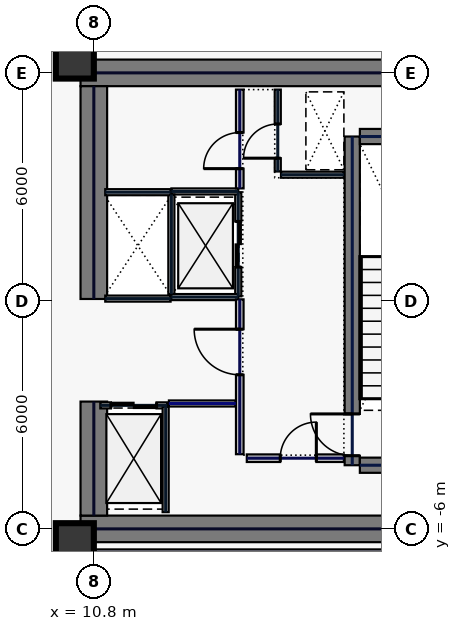
"""IFC4 building model, lengths in metres.
Left out: names, types, materials, properties, quantities, classifications, styles, units other than length and angle.
Written with IfcOpenShell. Run it as: python <this file> out.ifc"""

import sys

from ifc_helpers import new_model, si_unit, direction, frame, frame_2d, origin, origin_2d, place, context, subcontext, project, spatial, rectangle, hollow_rectangle, extrude, element, fill, save


model = new_model("IFC4")
c1 = context("Model", 3, precision=1e-05, world=origin(), true_north=direction((0.0, 1.0)))
c2 = subcontext(c1, "Body", "Model", "MODEL_VIEW")
j1 = project(units=[si_unit("LENGTHUNIT", "METRE"), si_unit("PLANEANGLEUNIT", "RADIAN")], contexts=[c1])
p1 = place(None, origin())
s1 = spatial("IfcSite", under=j1, at=p1, CompositionType="ELEMENT")
p2 = place(p1, origin())
s2 = spatial("IfcBuilding", under=s1, at=p2, CompositionType="ELEMENT")
p3 = place(p2, frame((0.0, 0.0, 152.2)))
s3 = spatial("IfcBuildingStorey", under=s2, at=p3, CompositionType="ELEMENT", Elevation=152.2)
for number, where, z_axis, x_axis in (
    (1, (10.45, 6.0, 0.0), (0.0, 0.0, 1.0), (1.0, 0.0, 0.0)),
    (2, (10.45, -6.0, 0.0), (0.0, 0.0, 1.0), (1.0, 0.0, 0.0)),
):
    element("IfcWall", number, at=place(p3, frame(where, z_axis=z_axis, x_axis=x_axis)), inside=s3, PredefinedType="SHEAR", context=c2, shape_type="SweptSolid", body=[
        extrude(rectangle(XDim=11.55, YDim=0.7, at=frame_2d((5.775, 0.0))), origin(), (0.0, 0.0, 1.0), 3.74),
    ])
p4 = place(p3, frame((10.8, -5.65, 0.0), z_axis=(0.0, 0.0, 1.0), x_axis=(0.0, 1.0, 0.0)))
e3 = element("IfcWall", 3, at=p4, inside=s3, PredefinedType="SHEAR", context=c2, shape_type="SweptSolid", body=[
    extrude(rectangle(XDim=3.0, YDim=0.7, at=frame_2d((1.5, 0.0))), origin(), (0.0, 0.0, 1.0), 3.74),
])
p5 = place(p3, frame((10.8, 0.05, 0.0), z_axis=(0.0, 0.0, 1.0), x_axis=(0.0, 1.0, 0.0)))
e4 = element("IfcWall", 4, at=p5, inside=s3, PredefinedType="SHEAR", context=c2, shape_type="SweptSolid", body=[
    extrude(rectangle(XDim=5.6, YDim=0.7, at=frame_2d((2.8, 0.0))), origin(), (0.0, 0.0, 1.0), 3.74),
])
p6 = place(p3, frame((17.6, -4.325, 0.0), z_axis=(0.0, 0.0, 1.0), x_axis=(0.0, 1.0, 0.0)))
e5 = element("IfcWall", 5, at=p6, inside=s3, PredefinedType="SHEAR", context=c2, shape_type="SweptSolid", body=[
    extrude(rectangle(XDim=8.65, YDim=0.4, at=frame_2d((4.325, 0.0))), origin(), (0.0, 0.0, 1.0), 3.74),
])
p7 = place(p6, frame((0.25, 0.0, 0.0)))
e6 = element("IfcOpeningElement", 6, at=p7, cuts=e5, PredefinedType="OPENING", context=c2, shape_type="SweptSolid", body=[
    extrude(rectangle(XDim=1.1, YDim=2.2, at=frame_2d((0.55, 1.1))), frame((0.0, 0.21, 0.0), z_axis=(0.0, -1.0, 0.0), x_axis=(1.0, 0.0, 0.0)), (0.0, 0.0, 1.0), 0.42),
])
for number, where, z_axis, x_axis in (
    (7, (17.8, -4.325, 0.0), (0.0, 0.0, 1.0), (1.0, 0.0, 0.0)),
    (8, (17.8, 4.325, 0.0), (0.0, 0.0, 1.0), (1.0, 0.0, 0.0)),
):
    element("IfcWall", number, at=place(p3, frame(where, z_axis=z_axis, x_axis=x_axis)), inside=s3, PredefinedType="SHEAR", context=c2, shape_type="SweptSolid", body=[
        extrude(rectangle(XDim=3.4, YDim=0.4, at=frame_2d((1.7, 0.0))), origin(), (0.0, 0.0, 1.0), 3.74),
    ])
for number, where, z_axis, x_axis in (
    (9, (10.3, -6.35, 0.0), (0.0, 0.0, 1.0), (1.0, 0.0, 0.0)),
    (10, (10.3, 6.35, 0.0), (0.0, 0.0, 1.0), (1.0, 0.0, 0.0)),
):
    element("IfcColumn", number, at=place(p3, frame(where, z_axis=z_axis, x_axis=x_axis)), inside=s3, PredefinedType="COLUMN", context=c2, shape_type="SweptSolid", body=[
        extrude(hollow_rectangle(XDim=1.0, YDim=1.0, WallThickness=0.045, at=origin_2d()), origin(), (0.0, 0.0, 1.0), 3.74),
    ])
p8 = place(p3, frame((14.6, 0.12, 0.0), z_axis=(0.0, 0.0, 1.0), x_axis=(0.0, 1.0, 0.0)))
e11 = element("IfcWall", 11, at=p8, inside=s3, PredefinedType="PARTITIONING", context=c2, shape_type="SweptSolid", body=[
    extrude(rectangle(XDim=2.74, YDim=0.16, at=frame_2d((1.37, 0.0))), origin(), (0.0, 0.0, 1.0), 3.74),
])
p9 = place(p8, frame((0.77, 0.0, 0.0)))
e12 = element("IfcOpeningElement", 12, at=p9, cuts=e11, PredefinedType="OPENING", context=c2, shape_type="SweptSolid", body=[
    extrude(rectangle(XDim=1.2, YDim=2.2, at=frame_2d((0.6, 1.1))), frame((0.0, 0.09, 0.0), z_axis=(0.0, -1.0, 0.0), x_axis=(1.0, 0.0, 0.0)), (0.0, 0.0, 1.0), 0.18),
])
for number, where, z_axis, x_axis in (
    (13, (12.84, 0.1, 0.0), (0.0, 0.0, 1.0), (1.0, 0.0, 0.0)),
    (14, (12.84, 2.88, 0.0), (0.0, 0.0, 1.0), (1.0, 0.0, 0.0)),
):
    element("IfcWall", number, at=place(p3, frame(where, z_axis=z_axis, x_axis=x_axis)), inside=s3, PredefinedType="PARTITIONING", context=c2, shape_type="SweptSolid", body=[
        extrude(rectangle(XDim=1.76, YDim=0.16, at=frame_2d((0.88, 0.0))), origin(), (0.0, 0.0, 1.0), 3.74),
    ])
p10 = place(p3, frame((12.84, 0.18, 0.0), z_axis=(0.0, 0.0, 1.0), x_axis=(0.0, 1.0, 0.0)))
e15 = element("IfcWall", 15, at=p10, inside=s3, PredefinedType="PARTITIONING", context=c2, shape_type="SweptSolid", body=[
    extrude(rectangle(XDim=2.62, YDim=0.16, at=frame_2d((1.31, 0.0))), origin(), (0.0, 0.0, 1.0), 3.74),
])
p11 = place(p3, frame((10.97, -2.75, 0.0), z_axis=(0.0, 0.0, 1.0), x_axis=(1.0, 0.0, 0.0)))
e16 = element("IfcWall", 16, at=p11, inside=s3, PredefinedType="PARTITIONING", context=c2, shape_type="SweptSolid", body=[
    extrude(rectangle(XDim=1.76, YDim=0.16, at=frame_2d((0.88, 0.0))), origin(), (0.0, 0.0, 1.0), 3.74),
])
p12 = place(p11, frame((0.28, 0.0, 0.0)))
e17 = element("IfcOpeningElement", 17, at=p12, cuts=e16, PredefinedType="OPENING", context=c2, shape_type="SweptSolid", body=[
    extrude(rectangle(XDim=1.2, YDim=2.2, at=frame_2d((0.6, 1.1))), frame((0.0, 0.09, 0.0), z_axis=(0.0, -1.0, 0.0), x_axis=(1.0, 0.0, 0.0)), (0.0, 0.0, 1.0), 0.18),
])
for number, where, z_axis, x_axis in (
    (18, (11.1, 0.06, 0.0), (0.0, 0.0, 1.0), (1.0, 0.0, 0.0)),
    (19, (11.1, 2.86, 0.0), (0.0, 0.0, 1.0), (1.0, 0.0, 0.0)),
):
    element("IfcWall", number, at=place(p3, frame(where, z_axis=z_axis, x_axis=x_axis)), inside=s3, PredefinedType="PARTITIONING", context=c2, shape_type="SweptSolid", body=[
        extrude(rectangle(XDim=1.72, YDim=0.16, at=frame_2d((0.86, 0.0))), origin(), (0.0, 0.0, 1.0), 3.74),
    ])
p13 = place(p3, frame((15.64, 3.405, 0.0), z_axis=(0.0, 0.0, 1.0), x_axis=(0.0, 1.0, 0.0)))
e20 = element("IfcWall", 20, at=p13, inside=s3, PredefinedType="PARTITIONING", context=c2, shape_type="SweptSolid", body=[
    extrude(rectangle(XDim=2.155, YDim=0.16, at=frame_2d((1.078, 0.0))), origin(), (0.0, 0.0, 1.0), 3.74),
])
p14 = place(p13, frame((0.35, 0.0, 0.0)))
e21 = element("IfcOpeningElement", 21, at=p14, cuts=e20, PredefinedType="OPENING", context=c2, shape_type="SweptSolid", body=[
    extrude(rectangle(XDim=0.9, YDim=2.2, at=frame_2d((0.45, 1.1))), frame((0.0, 0.09, 0.0), z_axis=(0.0, -1.0, 0.0), x_axis=(1.0, 0.0, 0.0)), (0.0, 0.0, 1.0), 0.18),
])
p15 = place(p3, frame((15.725, 3.32, 0.0), z_axis=(0.0, 0.0, 1.0), x_axis=(1.0, 0.0, 0.0)))
e22 = element("IfcWall", 22, at=p15, inside=s3, PredefinedType="PARTITIONING", context=c2, shape_type="SweptSolid", body=[
    extrude(rectangle(XDim=1.655, YDim=0.16, at=frame_2d((0.827, 0.0))), origin(), (0.0, 0.0, 1.0), 3.74),
])
p16 = place(p3, frame((14.825, -4.14, 0.0), z_axis=(0.0, 0.0, 1.0), x_axis=(1.0, 0.0, 0.0)))
e23 = element("IfcWall", 23, at=p16, inside=s3, PredefinedType="SOLIDWALL", context=c2, shape_type="SweptSolid", body=[
    extrude(rectangle(XDim=2.555, YDim=0.2, at=frame_2d((1.277, 0.0))), origin(), (0.0, 0.0, 1.0), 3.74),
])
p17 = place(p16, frame((0.88, 0.0, 0.0)))
e24 = element("IfcOpeningElement", 24, at=p17, cuts=e23, PredefinedType="OPENING", context=c2, shape_type="SweptSolid", body=[
    extrude(rectangle(XDim=0.95, YDim=2.2, at=frame_2d((0.475, 1.1))), frame((0.0, 0.11, 0.0), z_axis=(0.0, -1.0, 0.0), x_axis=(1.0, 0.0, 0.0)), (0.0, 0.0, 1.0), 0.22),
])
p18 = place(p3, frame((12.775, -2.7, 0.0), z_axis=(0.0, 0.0, 1.0), x_axis=(1.0, 0.0, 0.0)))
e25 = element("IfcWall", 25, at=p18, inside=s3, PredefinedType="PARTITIONING", context=c2, shape_type="SweptSolid", body=[
    extrude(rectangle(XDim=1.76, YDim=0.16, at=frame_2d((0.88, 0.0))), origin(), (0.0, 0.0, 1.0), 3.74),
])
p19 = place(p3, frame((12.69, -5.56, 0.0), z_axis=(0.0, 0.0, 1.0), x_axis=(0.0, 1.0, 0.0)))
e26 = element("IfcWall", 26, at=p19, inside=s3, PredefinedType="PARTITIONING", context=c2, shape_type="SweptSolid", body=[
    extrude(rectangle(XDim=2.775, YDim=0.16, at=frame_2d((1.388, 0.0))), origin(), (0.0, 0.0, 1.0), 3.74),
])
p20 = place(p3, frame((14.64, 2.96, 0.0), z_axis=(0.0, 0.0, 1.0), x_axis=(0.0, 1.0, 0.0)))
e27 = element("IfcWall", 27, at=p20, inside=s3, PredefinedType="SOLIDWALL", context=c2, shape_type="SweptSolid", body=[
    extrude(rectangle(XDim=2.6, YDim=0.2, at=frame_2d((1.3, 0.0))), origin(), (0.0, 0.0, 1.0), 3.74),
])
p21 = place(p20, frame((0.52, 0.0, 0.0)))
e28 = element("IfcOpeningElement", 28, at=p21, cuts=e27, PredefinedType="OPENING", context=c2, shape_type="SweptSolid", body=[
    extrude(rectangle(XDim=0.95, YDim=2.2, at=frame_2d((0.475, 1.1))), frame((0.0, 0.11, 0.0), z_axis=(0.0, -1.0, 0.0), x_axis=(1.0, 0.0, 0.0)), (0.0, 0.0, 1.0), 0.22),
])
p22 = place(p3, frame((14.64, -4.035, 0.0), z_axis=(0.0, 0.0, 1.0), x_axis=(0.0, 1.0, 0.0)))
e29 = element("IfcWall", 29, at=p22, inside=s3, PredefinedType="SOLIDWALL", context=c2, shape_type="SweptSolid", body=[
    extrude(rectangle(XDim=4.075, YDim=0.2, at=frame_2d((2.038, 0.0))), origin(), (0.0, 0.0, 1.0), 3.74),
])
p23 = place(p22, frame((2.09, 0.0, 0.0)))
e30 = element("IfcOpeningElement", 30, at=p23, cuts=e29, PredefinedType="OPENING", context=c2, shape_type="SweptSolid", body=[
    extrude(rectangle(XDim=1.2, YDim=2.2, at=frame_2d((0.6, 1.1))), frame((0.0, 0.11, 0.0), z_axis=(0.0, -1.0, 0.0), x_axis=(1.0, 0.0, 0.0)), (0.0, 0.0, 1.0), 0.22),
])
p24 = place(p3, frame((10.63, -6.62, 0.0), z_axis=(0.0, 0.0, 1.0), x_axis=(1.0, 0.0, 0.0)))
e31 = element("IfcWall", 31, at=p24, inside=s3, PredefinedType="PARTITIONING", context=c2, shape_type="SweptSolid", body=[
    extrude(rectangle(XDim=14.335, YDim=0.16, at=frame_2d((7.167, 0.0))), origin(), (0.0, 0.0, 1.0), 3.74),
])
p25 = place(p7, origin())
e32 = element("IfcDoor", 32, at=p25, inside=s3, OperationType="SINGLE_SWING_RIGHT", PredefinedType="DOOR", context=c2, shape_type="SweptSolid", body=[
    extrude(rectangle(XDim=1.1, YDim=2.2, at=frame_2d((0.55, 1.1))), frame((0.0, 0.025, 0.0), z_axis=(0.0, -1.0, 0.0), x_axis=(1.0, 0.0, 0.0)), (0.0, 0.0, 1.0), 0.05),
])
fill(e6, e32)
p26 = place(p9, origin())
e33 = element("IfcDoor", 33, at=p26, inside=s3, OperationType="SLIDING_TO_LEFT", PredefinedType="DOOR", context=c2, shape_type="SweptSolid", body=[
    extrude(rectangle(XDim=1.2, YDim=2.2, at=frame_2d((0.6, 1.1))), frame((0.0, 0.025, 0.0), z_axis=(0.0, -1.0, 0.0), x_axis=(1.0, 0.0, 0.0)), (0.0, 0.0, 1.0), 0.05),
])
fill(e12, e33)
p27 = place(p12, origin())
e34 = element("IfcDoor", 34, at=p27, inside=s3, OperationType="SLIDING_TO_LEFT", PredefinedType="DOOR", context=c2, shape_type="SweptSolid", body=[
    extrude(rectangle(XDim=1.2, YDim=2.2, at=frame_2d((0.6, 1.1))), frame((0.0, 0.025, 0.0), z_axis=(0.0, -1.0, 0.0), x_axis=(1.0, 0.0, 0.0)), (0.0, 0.0, 1.0), 0.05),
])
fill(e17, e34)
p28 = place(p14, origin())
e35 = element("IfcDoor", 35, at=p28, inside=s3, OperationType="SINGLE_SWING_LEFT", PredefinedType="DOOR", context=c2, shape_type="SweptSolid", body=[
    extrude(rectangle(XDim=0.9, YDim=2.2, at=frame_2d((0.45, 1.1))), frame((0.0, 0.025, 0.0), z_axis=(0.0, -1.0, 0.0), x_axis=(1.0, 0.0, 0.0)), (0.0, 0.0, 1.0), 0.05),
])
fill(e21, e35)
p29 = place(p17, origin())
e36 = element("IfcDoor", 36, at=p29, inside=s3, OperationType="SINGLE_SWING_RIGHT", PredefinedType="DOOR", context=c2, shape_type="SweptSolid", body=[
    extrude(rectangle(XDim=0.95, YDim=2.2, at=frame_2d((0.475, 1.1))), frame((0.0, 0.025, 0.0), z_axis=(0.0, -1.0, 0.0), x_axis=(1.0, 0.0, 0.0)), (0.0, 0.0, 1.0), 0.05),
])
fill(e24, e36)
p30 = place(p21, origin())
e37 = element("IfcDoor", 37, at=p30, inside=s3, OperationType="SINGLE_SWING_LEFT", PredefinedType="DOOR", context=c2, shape_type="SweptSolid", body=[
    extrude(rectangle(XDim=0.95, YDim=2.2, at=frame_2d((0.475, 1.1))), frame((0.0, 0.025, 0.0), z_axis=(0.0, -1.0, 0.0), x_axis=(1.0, 0.0, 0.0)), (0.0, 0.0, 1.0), 0.05),
])
fill(e28, e37)
p31 = place(p23, origin())
e38 = element("IfcDoor", 38, at=p31, inside=s3, OperationType="SINGLE_SWING_RIGHT", PredefinedType="DOOR", context=c2, shape_type="SweptSolid", body=[
    extrude(rectangle(XDim=1.2, YDim=2.2, at=frame_2d((0.6, 1.1))), frame((0.0, 0.025, 0.0), z_axis=(0.0, -1.0, 0.0), x_axis=(1.0, 0.0, 0.0)), (0.0, 0.0, 1.0), 0.05),
])
fill(e30, e38)
save(model, sys.argv[1])
